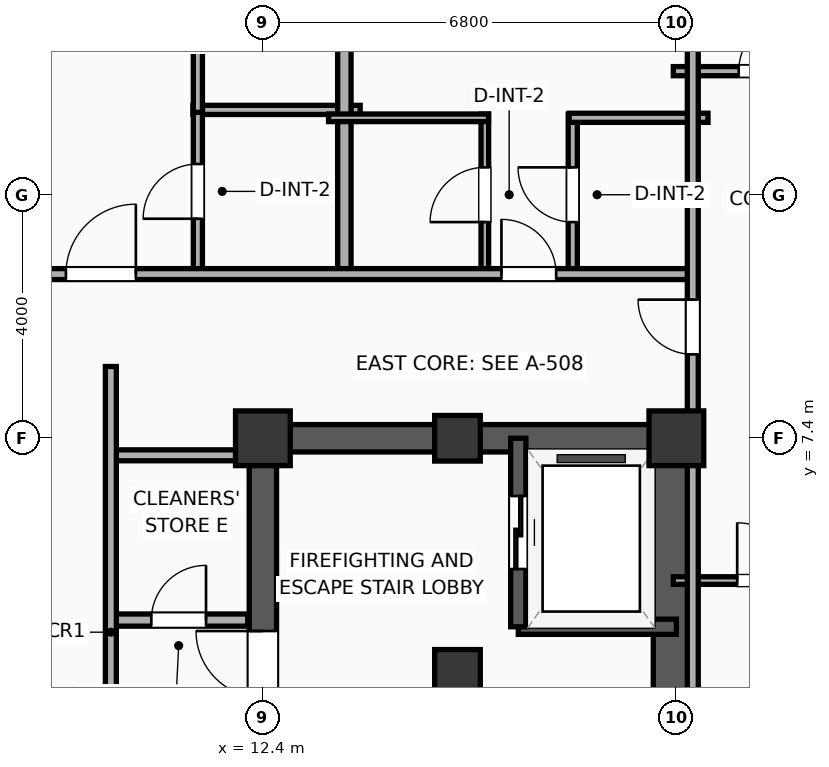
"""IFC4 building model, lengths in metres.
Left out: names, types, materials, properties, quantities, classifications, styles, units other than length and angle.
Written with IfcOpenShell. Run it as: python <this file> out.ifc"""

import sys

from ifc_helpers import new_model, si_unit, direction, frame, frame_2d, origin, origin_2d, place, context, subcontext, project, spatial, rectangle, extrude, element, fill, save


model = new_model("IFC4")
c1 = context("Model", 3, precision=1e-05, world=origin(), true_north=direction((0.0, 1.0)))
c2 = subcontext(c1, "Body", "Model", "MODEL_VIEW")
j1 = project(units=[si_unit("LENGTHUNIT", "METRE"), si_unit("PLANEANGLEUNIT", "RADIAN")], contexts=[c1])
p1 = place(None, origin())
s1 = spatial("IfcSite", under=j1, at=p1, CompositionType="ELEMENT")
p2 = place(p1, origin())
s2 = spatial("IfcBuilding", under=s1, at=p2, CompositionType="ELEMENT")
p3 = place(p2, frame((0.0, 0.0, 200.2)))
s3 = spatial("IfcBuildingStorey", under=s2, at=p3, CompositionType="ELEMENT", Elevation=200.2)
p4 = place(p3, frame((15.6, 3.55, 0.0), z_axis=(0.0, 0.0, 1.0), x_axis=(1.0, 0.0, 0.0)))
e1 = element("IfcColumn", 1, at=p4, inside=s3, PredefinedType="COLUMN", context=c2, shape_type="SweptSolid", body=[
    extrude(rectangle(XDim=0.75, YDim=0.75, at=origin_2d()), origin(), (0.0, 0.0, 1.0), 3.9),
])
p5 = place(p3, frame((12.4, 7.4, 0.0), z_axis=(0.0, 0.0, 1.0), x_axis=(1.0, 0.0, 0.0)))
e2 = element("IfcColumn", 2, at=p5, inside=s3, PredefinedType="COLUMN", context=c2, shape_type="SweptSolid", body=[
    extrude(rectangle(XDim=0.9, YDim=0.9, at=origin_2d()), origin(), (0.0, 0.0, 1.0), 3.9),
])
p6 = place(p3, frame((15.6, 7.4, 0.0), z_axis=(0.0, 0.0, 1.0), x_axis=(1.0, 0.0, 0.0)))
e3 = element("IfcColumn", 3, at=p6, inside=s3, PredefinedType="COLUMN", context=c2, shape_type="SweptSolid", body=[
    extrude(rectangle(XDim=0.75, YDim=0.75, at=origin_2d()), origin(), (0.0, 0.0, 1.0), 3.9),
])
p7 = place(p3, frame((19.2, 7.4, 0.0), z_axis=(0.0, 0.0, 1.0), x_axis=(1.0, 0.0, 0.0)))
e4 = element("IfcColumn", 4, at=p7, inside=s3, PredefinedType="COLUMN", context=c2, shape_type="SweptSolid", body=[
    extrude(rectangle(XDim=0.9, YDim=0.9, at=origin_2d()), origin(), (0.0, 0.0, 1.0), 3.9),
])
p8 = place(p3, frame((12.175, 7.4, 0.0), z_axis=(0.0, 0.0, 1.0), x_axis=(1.0, 0.0, 0.0)))
e5 = element("IfcWall", 5, at=p8, inside=s3, PredefinedType="SHEAR", context=c2, shape_type="SweptSolid", body=[
    extrude(rectangle(XDim=7.25, YDim=0.45, at=frame_2d((3.625, 0.0))), origin(), (0.0, 0.0, 1.0), 3.65),
])
p9 = place(p3, frame((12.4, -7.4, 0.0), z_axis=(0.0, 0.0, 1.0), x_axis=(0.0, 1.0, 0.0)))
e6 = element("IfcWall", 6, at=p9, inside=s3, PredefinedType="SHEAR", context=c2, shape_type="SweptSolid", body=[
    extrude(rectangle(XDim=14.8, YDim=0.45, at=frame_2d((7.4, 0.0))), origin(), (0.0, 0.0, 1.0), 3.65),
])
p10 = place(p9, frame((3.45, 0.0, 0.0)))
e7 = element("IfcOpeningElement", 7, at=p10, cuts=e6, PredefinedType="OPENING", context=c2, shape_type="SweptSolid", body=[
    extrude(rectangle(XDim=1.1, YDim=2.05, at=frame_2d((0.55, 1.025))), frame((0.0, 0.235, 0.0), z_axis=(0.0, -1.0, 0.0), x_axis=(1.0, 0.0, 0.0)), (0.0, 0.0, 1.0), 0.47),
])
p11 = place(p9, frame((6.05, 0.0, 0.0)))
e8 = element("IfcOpeningElement", 8, at=p11, cuts=e6, PredefinedType="OPENING", context=c2, shape_type="SweptSolid", body=[
    extrude(rectangle(XDim=1.1, YDim=2.05, at=frame_2d((0.55, 1.025))), frame((0.0, 0.235, 0.0), z_axis=(0.0, -1.0, 0.0), x_axis=(1.0, 0.0, 0.0)), (0.0, 0.0, 1.0), 0.47),
])
p12 = place(p9, frame((8.6, 0.0, 0.0)))
e9 = element("IfcOpeningElement", 9, at=p12, cuts=e6, PredefinedType="OPENING", context=c2, shape_type="SweptSolid", body=[
    extrude(rectangle(XDim=1.1, YDim=2.05, at=frame_2d((0.55, 1.025))), frame((0.0, 0.235, 0.0), z_axis=(0.0, -1.0, 0.0), x_axis=(1.0, 0.0, 0.0)), (0.0, 0.0, 1.0), 0.47),
])
p13 = place(p9, frame((10.53, 0.0, 0.0)))
e10 = element("IfcOpeningElement", 10, at=p13, cuts=e6, PredefinedType="OPENING", context=c2, shape_type="SweptSolid", body=[
    extrude(rectangle(XDim=1.1, YDim=2.05, at=frame_2d((0.55, 1.025))), frame((0.0, 0.235, 0.0), z_axis=(0.0, -1.0, 0.0), x_axis=(1.0, 0.0, 0.0)), (0.0, 0.0, 1.0), 0.47),
])
p14 = place(p9, frame((1.0, 0.0, 0.0)))
e11 = element("IfcOpeningElement", 11, at=p14, cuts=e6, PredefinedType="OPENING", context=c2, shape_type="SweptSolid", body=[
    extrude(rectangle(XDim=0.9, YDim=2.05, at=frame_2d((0.45, 1.025))), frame((0.0, 0.235, 0.0), z_axis=(0.0, -1.0, 0.0), x_axis=(1.0, 0.0, 0.0)), (0.0, 0.0, 1.0), 0.47),
])
p15 = place(p3, frame((19.145, -7.4, 0.0), z_axis=(0.0, 0.0, 1.0), x_axis=(0.0, 1.0, 0.0)))
e12 = element("IfcWall", 12, at=p15, inside=s3, PredefinedType="SHEAR", context=c2, shape_type="SweptSolid", body=[
    extrude(rectangle(XDim=14.8, YDim=0.65, at=frame_2d((7.4, 0.0))), origin(), (0.0, 0.0, 1.0), 3.65),
])
p16 = place(p3, frame((16.6, 4.3, 0.0), z_axis=(0.0, 0.0, 1.0), x_axis=(1.0, 0.0, 0.0)))
e13 = element("IfcWall", 13, at=p16, inside=s3, PredefinedType="SOLIDWALL", context=c2, shape_type="SweptSolid", body=[
    extrude(rectangle(XDim=2.6, YDim=0.25, at=frame_2d((1.3, 0.0))), origin(), (0.0, 0.0, 1.0), 3.65),
])
p17 = place(p3, frame((16.6, 7.4, 0.0), z_axis=(0.0, 0.0, 1.0), x_axis=(0.0, -1.0, 0.0)))
e14 = element("IfcWall", 14, at=p17, inside=s3, PredefinedType="SOLIDWALL", context=c2, shape_type="SweptSolid", body=[
    extrude(rectangle(XDim=3.1, YDim=0.25, at=frame_2d((1.55, 0.0))), origin(), (0.0, 0.0, 1.0), 3.65),
])
p18 = place(p17, frame((0.95, 0.0, 0.0)))
e15 = element("IfcOpeningElement", 15, at=p18, cuts=e14, PredefinedType="OPENING", context=c2, shape_type="SweptSolid", body=[
    extrude(rectangle(XDim=1.2, YDim=2.05, at=frame_2d((0.6, 1.025))), frame((0.0, 0.135, 0.0), z_axis=(0.0, -1.0, 0.0), x_axis=(1.0, 0.0, 0.0)), (0.0, 0.0, 1.0), 0.27),
])
p19 = place(p3, frame((9.88, 4.41, 0.0), z_axis=(0.0, 0.0, 1.0), x_axis=(1.0, 0.0, 0.0)))
e16 = element("IfcWall", 16, at=p19, inside=s3, PredefinedType="PARTITIONING", context=c2, shape_type="SweptSolid", body=[
    extrude(rectangle(XDim=2.27, YDim=0.2, at=frame_2d((1.135, 0.0))), origin(), (0.0, 0.0, 1.0), 3.65),
])
p20 = place(p19, frame((0.685, 0.0, 0.0)))
e17 = element("IfcOpeningElement", 17, at=p20, cuts=e16, PredefinedType="OPENING", context=c2, shape_type="SweptSolid", body=[
    extrude(rectangle(XDim=0.9, YDim=2.05, at=frame_2d((0.45, 1.025))), frame((0.0, 0.11, 0.0), z_axis=(0.0, -1.0, 0.0), x_axis=(1.0, 0.0, 0.0)), (0.0, 0.0, 1.0), 0.22),
])
p21 = place(p3, frame((9.88, 7.12, 0.0), z_axis=(0.0, 0.0, 1.0), x_axis=(1.0, 0.0, 0.0)))
e18 = element("IfcWall", 18, at=p21, inside=s3, PredefinedType="PARTITIONING", context=c2, shape_type="SweptSolid", body=[
    extrude(rectangle(XDim=2.27, YDim=0.18, at=frame_2d((1.135, 0.0))), origin(), (0.0, 0.0, 1.0), 3.65),
])
p22 = place(p3, frame((9.9, -8.58, 0.0), z_axis=(0.0, 0.0, 1.0), x_axis=(0.0, 1.0, 0.0)))
e19 = element("IfcWall", 19, at=p22, inside=s3, PredefinedType="PARTITIONING", context=c2, shape_type="SweptSolid", body=[
    extrude(rectangle(XDim=17.16, YDim=0.18, at=frame_2d((8.58, 0.0))), origin(), (0.0, 0.0, 1.0), 3.65),
])
p23 = place(p22, frame((7.172, 0.0, 0.0)))
e20 = element("IfcOpeningElement", 20, at=p23, cuts=e19, PredefinedType="OPENING", context=c2, shape_type="SweptSolid", body=[
    extrude(rectangle(XDim=1.1, YDim=2.05, at=frame_2d((0.55, 1.025))), frame((0.0, 0.1, 0.0), z_axis=(0.0, -1.0, 0.0), x_axis=(1.0, 0.0, 0.0)), (0.0, 0.0, 1.0), 0.2),
])
p24 = place(p3, frame((11.251, 12.8, 0.0), z_axis=(0.0, 0.0, 1.0), x_axis=(1.0, 0.0, 0.0)))
e21 = element("IfcWall", 21, at=p24, inside=s3, PredefinedType="PLUMBINGWALL", context=c2, shape_type="SweptSolid", body=[
    extrude(rectangle(XDim=2.749, YDim=0.15, at=frame_2d((1.375, 0.0))), origin(), (0.0, 0.0, 1.0), 3.65),
])
p25 = place(p3, frame((11.331, 10.08, 0.0), z_axis=(0.0, 0.0, 1.0), x_axis=(0.0, 1.0, 0.0)))
e22 = element("IfcWall", 22, at=p25, inside=s3, PredefinedType="PLUMBINGWALL", context=c2, shape_type="SweptSolid", body=[
    extrude(rectangle(XDim=2.76, YDim=0.15, at=frame_2d((1.38, 0.0))), origin(), (0.0, 0.0, 1.0), 3.65),
])
p26 = place(p25, frame((0.93, 0.0, 0.0)))
e23 = element("IfcOpeningElement", 23, at=p26, cuts=e22, PredefinedType="OPENING", context=c2, shape_type="SweptSolid", body=[
    extrude(rectangle(XDim=0.9, YDim=2.05, at=frame_2d((0.45, 1.025))), frame((0.0, 0.085, 0.0), z_axis=(0.0, -1.0, 0.0), x_axis=(1.0, 0.0, 0.0)), (0.0, 0.0, 1.0), 0.17),
])
p27 = place(p3, frame((11.331, 12.76, 0.0), z_axis=(0.0, 0.0, 1.0), x_axis=(0.0, 1.0, 0.0)))
e24 = element("IfcWall", 24, at=p27, inside=s3, PredefinedType="PLUMBINGWALL", context=c2, shape_type="SweptSolid", body=[
    extrude(rectangle(XDim=7.317, YDim=0.15, at=frame_2d((3.658, 0.0))), origin(), (0.0, 0.0, 1.0), 3.65),
])
p28 = place(p27, frame((3.208, 0.0, 0.0)))
e25 = element("IfcOpeningElement", 25, at=p28, cuts=e24, PredefinedType="OPENING", context=c2, shape_type="SweptSolid", body=[
    extrude(rectangle(XDim=0.9, YDim=2.05, at=frame_2d((0.45, 1.025))), frame((0.0, 0.085, 0.0), z_axis=(0.0, -1.0, 0.0), x_axis=(1.0, 0.0, 0.0)), (0.0, 0.0, 1.0), 0.17),
])
p29 = place(p3, frame((13.74, 10.02, 0.0), z_axis=(0.0, 0.0, 1.0), x_axis=(0.0, 1.0, 0.0)))
e26 = element("IfcWall", 26, at=p29, inside=s3, PredefinedType="PARTITIONING", context=c2, shape_type="SweptSolid", body=[
    extrude(rectangle(XDim=10.01, YDim=0.22, at=frame_2d((5.005, 0.0))), origin(), (0.0, 0.0, 1.0), 3.65),
])
p30 = place(p3, frame((16.05, 10.08, 0.0), z_axis=(0.0, 0.0, 1.0), x_axis=(0.0, 1.0, 0.0)))
e27 = element("IfcWall", 27, at=p30, inside=s3, PredefinedType="PARTITIONING", context=c2, shape_type="SweptSolid", body=[
    extrude(rectangle(XDim=2.65, YDim=0.125, at=frame_2d((1.325, 0.0))), origin(), (0.0, 0.0, 1.0), 2.54),
])
p31 = place(p30, frame((0.875, 0.0, 0.0)))
e28 = element("IfcOpeningElement", 28, at=p31, cuts=e27, PredefinedType="OPENING", context=c2, shape_type="SweptSolid", body=[
    extrude(rectangle(XDim=0.9, YDim=2.05, at=frame_2d((0.45, 1.025))), frame((0.0, 0.073, 0.0), z_axis=(0.0, -1.0, 0.0), x_axis=(1.0, 0.0, 0.0)), (0.0, 0.0, 1.0), 0.145),
])
p32 = place(p3, frame((17.496, 10.08, 0.0), z_axis=(0.0, 0.0, 1.0), x_axis=(0.0, 1.0, 0.0)))
e29 = element("IfcWall", 29, at=p32, inside=s3, PredefinedType="PLUMBINGWALL", context=c2, shape_type="SweptSolid", body=[
    extrude(rectangle(XDim=2.65, YDim=0.15, at=frame_2d((1.325, 0.0))), origin(), (0.0, 0.0, 1.0), 3.65),
])
p33 = place(p32, frame((0.875, 0.0, 0.0)))
e30 = element("IfcOpeningElement", 30, at=p33, cuts=e29, PredefinedType="OPENING", context=c2, shape_type="SweptSolid", body=[
    extrude(rectangle(XDim=0.9, YDim=2.05, at=frame_2d((0.45, 1.025))), frame((0.0, 0.085, 0.0), z_axis=(0.0, -1.0, 0.0), x_axis=(1.0, 0.0, 0.0)), (0.0, 0.0, 1.0), 0.17),
])
p34 = place(p3, frame((13.48, 12.67, 0.0), z_axis=(0.0, 0.0, 1.0), x_axis=(1.0, 0.0, 0.0)))
e31 = element("IfcWall", 31, at=p34, inside=s3, PredefinedType="PARTITIONING", context=c2, shape_type="SweptSolid", body=[
    extrude(rectangle(XDim=2.63, YDim=0.125, at=frame_2d((1.315, 0.0))), origin(), (0.0, 0.0, 1.0), 3.65),
])
p35 = place(p3, frame((17.436, 12.67, 0.0), z_axis=(0.0, 0.0, 1.0), x_axis=(1.0, 0.0, 0.0)))
e32 = element("IfcWall", 32, at=p35, inside=s3, PredefinedType="PLUMBINGWALL", context=c2, shape_type="SweptSolid", body=[
    extrude(rectangle(XDim=2.284, YDim=0.15, at=frame_2d((1.142, 0.0))), origin(), (0.0, 0.0, 1.0), 3.65),
])
p36 = place(p3, frame((8.08, 10.1, 0.0), z_axis=(0.0, 0.0, 1.0), x_axis=(1.0, 0.0, 0.0)))
e33 = element("IfcWall", 33, at=p36, inside=s3, PredefinedType="PARTITIONING", context=c2, shape_type="SweptSolid", body=[
    extrude(rectangle(XDim=11.42, YDim=0.18, at=frame_2d((5.71, 0.0))), origin(), (0.0, 0.0, 1.0), 3.65),
])
p37 = place(p36, frame((1.081, 0.0, 0.0)))
e34 = element("IfcOpeningElement", 34, at=p37, cuts=e33, PredefinedType="OPENING", context=c2, shape_type="SweptSolid", body=[
    extrude(rectangle(XDim=1.15, YDim=2.05, at=frame_2d((0.575, 1.025))), frame((0.0, 0.1, 0.0), z_axis=(0.0, -1.0, 0.0), x_axis=(1.0, 0.0, 0.0)), (0.0, 0.0, 1.0), 0.2),
])
p38 = place(p36, frame((8.243, 0.0, 0.0)))
e35 = element("IfcOpeningElement", 35, at=p38, cuts=e33, PredefinedType="OPENING", context=c2, shape_type="SweptSolid", body=[
    extrude(rectangle(XDim=0.9, YDim=2.05, at=frame_2d((0.45, 1.025))), frame((0.0, 0.1, 0.0), z_axis=(0.0, -1.0, 0.0), x_axis=(1.0, 0.0, 0.0)), (0.0, 0.0, 1.0), 0.2),
])
p39 = place(p3, frame((19.15, 5.06, 0.0), z_axis=(0.0, 0.0, 1.0), x_axis=(1.0, 0.0, 0.0)))
e36 = element("IfcWall", 36, at=p39, inside=s3, PredefinedType="PARTITIONING", context=c2, shape_type="SweptSolid", body=[
    extrude(rectangle(XDim=3.05, YDim=0.125, at=frame_2d((1.525, 0.0))), origin(), (0.0, 0.0, 1.0), 3.65),
])
p40 = place(p39, frame((1.05, 0.0, 0.0)))
e37 = element("IfcOpeningElement", 37, at=p40, cuts=e36, PredefinedType="OPENING", context=c2, shape_type="SweptSolid", body=[
    extrude(rectangle(XDim=0.95, YDim=2.05, at=frame_2d((0.475, 1.025))), frame((0.0, 0.073, 0.0), z_axis=(0.0, -1.0, 0.0), x_axis=(1.0, 0.0, 0.0)), (0.0, 0.0, 1.0), 0.145),
])
p41 = place(p3, frame((19.15, 13.437, 0.0), z_axis=(0.0, 0.0, 1.0), x_axis=(1.0, 0.0, 0.0)))
e38 = element("IfcWall", 38, at=p41, inside=s3, PredefinedType="PLUMBINGWALL", context=c2, shape_type="SweptSolid", body=[
    extrude(rectangle(XDim=3.05, YDim=0.15, at=frame_2d((1.525, 0.0))), origin(), (0.0, 0.0, 1.0), 3.65),
])
p42 = place(p41, frame((1.075, 0.0, 0.0)))
e39 = element("IfcOpeningElement", 39, at=p42, cuts=e38, PredefinedType="OPENING", context=c2, shape_type="SweptSolid", body=[
    extrude(rectangle(XDim=0.9, YDim=2.05, at=frame_2d((0.45, 1.025))), frame((0.0, 0.085, 0.0), z_axis=(0.0, -1.0, 0.0), x_axis=(1.0, 0.0, 0.0)), (0.0, 0.0, 1.0), 0.17),
])
p43 = place(p3, frame((19.47, -1.6, 0.0), z_axis=(0.0, 0.0, 1.0), x_axis=(0.0, 1.0, 0.0)))
e40 = element("IfcWall", 40, at=p43, inside=s3, PredefinedType="PARTITIONING", context=c2, shape_type="SweptSolid", body=[
    extrude(rectangle(XDim=21.63, YDim=0.18, at=frame_2d((10.815, 0.0))), origin(), (0.0, 0.0, 1.0), 3.65),
])
p44 = place(p43, frame((10.38, 0.0, 0.0)))
e41 = element("IfcOpeningElement", 41, at=p44, cuts=e40, PredefinedType="OPENING", context=c2, shape_type="SweptSolid", body=[
    extrude(rectangle(XDim=0.9, YDim=2.05, at=frame_2d((0.45, 1.025))), frame((0.0, 0.1, 0.0), z_axis=(0.0, -1.0, 0.0), x_axis=(1.0, 0.0, 0.0)), (0.0, 0.0, 1.0), 0.2),
])
p45 = place(p18, origin())
e42 = element("IfcDoor", 42, at=p45, inside=s3, OperationType="SLIDING_TO_LEFT", PredefinedType="DOOR", context=c2, shape_type="SweptSolid", body=[
    extrude(rectangle(XDim=1.2, YDim=2.05, at=frame_2d((0.6, 1.025))), frame((0.0, 0.025, 0.0), z_axis=(0.0, -1.0, 0.0), x_axis=(1.0, 0.0, 0.0)), (0.0, 0.0, 1.0), 0.05),
])
fill(e15, e42)
p46 = place(p20, origin())
e43 = element("IfcDoor", 43, at=p46, inside=s3, OperationType="SINGLE_SWING_RIGHT", PredefinedType="DOOR", context=c2, shape_type="SweptSolid", body=[
    extrude(rectangle(XDim=0.9, YDim=2.05, at=frame_2d((0.45, 1.025))), frame((0.0, 0.025, 0.0), z_axis=(0.0, -1.0, 0.0), x_axis=(1.0, 0.0, 0.0)), (0.0, 0.0, 1.0), 0.05),
])
fill(e17, e43)
p47 = place(p26, origin())
e44 = element("IfcDoor", 44, at=p47, inside=s3, OperationType="SINGLE_SWING_LEFT", PredefinedType="DOOR", context=c2, shape_type="SweptSolid", body=[
    extrude(rectangle(XDim=0.9, YDim=2.05, at=frame_2d((0.45, 1.025))), frame((0.0, 0.025, 0.0), z_axis=(0.0, -1.0, 0.0), x_axis=(1.0, 0.0, 0.0)), (0.0, 0.0, 1.0), 0.05),
])
fill(e23, e44)
p48 = place(p31, origin())
e45 = element("IfcDoor", 45, at=p48, inside=s3, OperationType="SINGLE_SWING_LEFT", PredefinedType="DOOR", context=c2, shape_type="SweptSolid", body=[
    extrude(rectangle(XDim=0.9, YDim=2.05, at=frame_2d((0.45, 1.025))), frame((0.0, 0.025, 0.0), z_axis=(0.0, -1.0, 0.0), x_axis=(1.0, 0.0, 0.0)), (0.0, 0.0, 1.0), 0.05),
])
fill(e28, e45)
p49 = place(p33, origin())
e46 = element("IfcDoor", 46, at=p49, inside=s3, OperationType="SINGLE_SWING_RIGHT", PredefinedType="DOOR", context=c2, shape_type="SweptSolid", body=[
    extrude(rectangle(XDim=0.9, YDim=2.05, at=frame_2d((0.45, 1.025))), frame((0.0, 0.025, 0.0), z_axis=(0.0, -1.0, 0.0), x_axis=(1.0, 0.0, 0.0)), (0.0, 0.0, 1.0), 0.05),
])
fill(e30, e46)
p50 = place(p37, origin())
e47 = element("IfcDoor", 47, at=p50, inside=s3, OperationType="SINGLE_SWING_RIGHT", PredefinedType="DOOR", context=c2, shape_type="SweptSolid", body=[
    extrude(rectangle(XDim=1.15, YDim=2.05, at=frame_2d((0.575, 1.025))), frame((0.0, 0.025, 0.0), z_axis=(0.0, -1.0, 0.0), x_axis=(1.0, 0.0, 0.0)), (0.0, 0.0, 1.0), 0.05),
])
fill(e34, e47)
p51 = place(p38, origin())
e48 = element("IfcDoor", 48, at=p51, inside=s3, OperationType="SINGLE_SWING_LEFT", PredefinedType="DOOR", context=c2, shape_type="SweptSolid", body=[
    extrude(rectangle(XDim=0.9, YDim=2.05, at=frame_2d((0.45, 1.025))), frame((0.0, 0.025, 0.0), z_axis=(0.0, -1.0, 0.0), x_axis=(1.0, 0.0, 0.0)), (0.0, 0.0, 1.0), 0.05),
])
fill(e35, e48)
p52 = place(p40, origin())
e49 = element("IfcDoor", 49, at=p52, inside=s3, OperationType="SINGLE_SWING_LEFT", PredefinedType="DOOR", context=c2, shape_type="SweptSolid", body=[
    extrude(rectangle(XDim=0.95, YDim=2.05, at=frame_2d((0.475, 1.025))), frame((0.0, 0.025, 0.0), z_axis=(0.0, -1.0, 0.0), x_axis=(1.0, 0.0, 0.0)), (0.0, 0.0, 1.0), 0.05),
])
fill(e37, e49)
p53 = place(p42, origin())
e50 = element("IfcDoor", 50, at=p53, inside=s3, OperationType="SINGLE_SWING_RIGHT", PredefinedType="DOOR", context=c2, shape_type="SweptSolid", body=[
    extrude(rectangle(XDim=0.9, YDim=2.05, at=frame_2d((0.45, 1.025))), frame((0.0, 0.025, 0.0), z_axis=(0.0, -1.0, 0.0), x_axis=(1.0, 0.0, 0.0)), (0.0, 0.0, 1.0), 0.05),
])
fill(e39, e50)
p54 = place(p44, origin())
e51 = element("IfcDoor", 51, at=p54, inside=s3, OperationType="SINGLE_SWING_RIGHT", PredefinedType="DOOR", context=c2, shape_type="SweptSolid", body=[
    extrude(rectangle(XDim=0.9, YDim=2.05, at=frame_2d((0.45, 1.025))), frame((0.0, 0.025, 0.0), z_axis=(0.0, -1.0, 0.0), x_axis=(1.0, 0.0, 0.0)), (0.0, 0.0, 1.0), 0.05),
])
fill(e41, e51)
p55 = place(p13, origin())
e52 = element("IfcDoor", 52, at=p55, inside=s3, OperationType="SINGLE_SWING_RIGHT", PredefinedType="DOOR", context=c2, shape_type="SweptSolid", body=[
    extrude(rectangle(XDim=1.1, YDim=2.05, at=frame_2d((0.55, 1.025))), frame((0.0, 0.025, 0.0), z_axis=(0.0, -1.0, 0.0), x_axis=(1.0, 0.0, 0.0)), (0.0, 0.0, 1.0), 0.05),
])
fill(e10, e52)
save(model, sys.argv[1])
